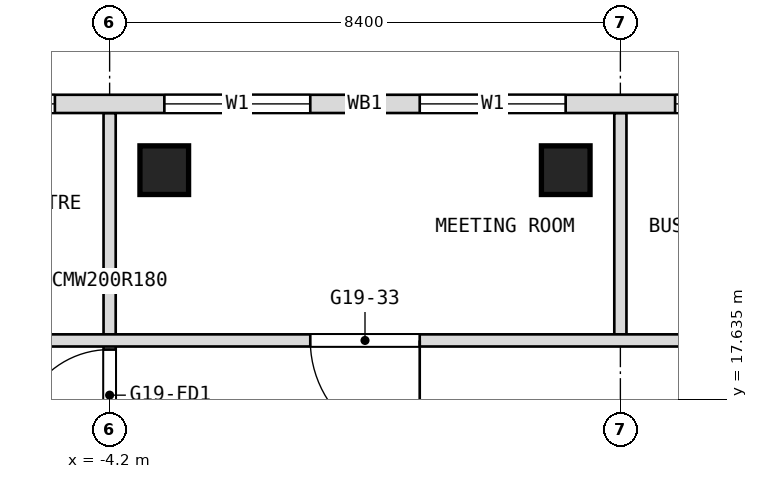
"""IFC4 building model, lengths in metres.
Left out: names, types, materials, properties, quantities, classifications, styles, units other than length and angle.
Written with IfcOpenShell. Run it as: python <this file> out.ifc"""

import sys

from ifc_helpers import new_model, si_unit, direction, frame, frame_2d, origin, origin_2d, place, context, subcontext, project, spatial, rectangle, extrude, element, fill, save


model = new_model("IFC4")
c1 = context("Model", 3, precision=1e-05, world=origin(), true_north=direction((0.0, 1.0)))
c2 = subcontext(c1, "Body", "Model", "MODEL_VIEW")
j1 = project(units=[si_unit("LENGTHUNIT", "METRE"), si_unit("PLANEANGLEUNIT", "RADIAN")], contexts=[c1])
p1 = place(None, origin())
s1 = spatial("IfcSite", under=j1, at=p1, CompositionType="ELEMENT")
p2 = place(p1, origin())
s2 = spatial("IfcBuilding", under=s1, at=p2, CompositionType="ELEMENT")
p3 = place(p2, frame((0.0, 0.0, 223.7)))
s3 = spatial("IfcBuildingStorey", under=s2, at=p3, CompositionType="ELEMENT", Elevation=223.7)
for number, where, z_axis, x_axis in (
    (1, (-3.302, 21.4, 0.0), (0.0, 0.0, 1.0), (1.0, 0.0, 0.0)),
    (2, (3.302, 21.4, 0.0), (0.0, 0.0, 1.0), (1.0, 0.0, 0.0)),
):
    element("IfcColumn", number, at=place(p3, frame(where, z_axis=z_axis, x_axis=x_axis)), inside=s3, PredefinedType="COLUMN", context=c2, shape_type="SweptSolid", body=[
        extrude(rectangle(XDim=0.8, YDim=0.8, at=origin_2d()), origin(), (0.0, 0.0, 1.0), 3.6),
    ])
p4 = place(p3, frame((4.2, 18.7, 0.0), z_axis=(0.0, 0.0, 1.0), x_axis=(0.0, 1.0, 0.0)))
e3 = element("IfcWall", 3, at=p4, inside=s3, PredefinedType="PARTITIONING", context=c2, shape_type="SweptSolid", body=[
    extrude(rectangle(XDim=3.64, YDim=0.2, at=frame_2d((1.82, 0.0))), origin(), (0.0, 0.0, 1.0), 3.34),
])
p5 = place(p3, frame((-4.2, 16.8, 0.0), z_axis=(0.0, 0.0, 1.0), x_axis=(0.0, 1.0, 0.0)))
e4 = element("IfcWall", 4, at=p5, inside=s3, PredefinedType="PARTITIONING", context=c2, shape_type="SweptSolid", body=[
    extrude(rectangle(XDim=5.54, YDim=0.2, at=frame_2d((2.77, 0.0))), origin(), (0.0, 0.0, 1.0), 3.34),
])
p6 = place(p5, frame((0.15, 0.0, 0.0)))
e5 = element("IfcOpeningElement", 5, at=p6, cuts=e4, PredefinedType="OPENING", context=c2, shape_type="SweptSolid", body=[
    extrude(rectangle(XDim=1.5, YDim=2.1, at=frame_2d((0.75, 1.05))), frame((0.0, 0.1, 0.0), z_axis=(0.0, -1.0, 0.0), x_axis=(1.0, 0.0, 0.0)), (0.0, 0.0, 1.0), 0.2),
])
p7 = place(p3, frame((-16.9, 18.6, 0.0), z_axis=(0.0, 0.0, 1.0), x_axis=(1.0, 0.0, 0.0)))
e6 = element("IfcWall", 6, at=p7, inside=s3, PredefinedType="PARTITIONING", context=c2, shape_type="SweptSolid", body=[
    extrude(rectangle(XDim=33.8, YDim=0.2, at=frame_2d((16.9, 0.0))), origin(), (0.0, 0.0, 1.0), 3.34),
])
p8 = place(p7, frame((1.7, 0.0, 0.0)))
e7 = element("IfcOpeningElement", 7, at=p8, cuts=e6, PredefinedType="OPENING", context=c2, shape_type="SweptSolid", body=[
    extrude(rectangle(XDim=1.0, YDim=2.1, at=frame_2d((0.5, 1.05))), frame((0.0, 0.1, 0.0), z_axis=(0.0, -1.0, 0.0), x_axis=(1.0, 0.0, 0.0)), (0.0, 0.0, 1.0), 0.2),
])
p9 = place(p7, frame((7.6, 0.0, 0.0)))
e8 = element("IfcOpeningElement", 8, at=p9, cuts=e6, PredefinedType="OPENING", context=c2, shape_type="SweptSolid", body=[
    extrude(rectangle(XDim=1.8, YDim=2.1, at=frame_2d((0.9, 1.05))), frame((0.0, 0.1, 0.0), z_axis=(0.0, -1.0, 0.0), x_axis=(1.0, 0.0, 0.0)), (0.0, 0.0, 1.0), 0.2),
])
p10 = place(p7, frame((16.0, 0.0, 0.0)))
e9 = element("IfcOpeningElement", 9, at=p10, cuts=e6, PredefinedType="OPENING", context=c2, shape_type="SweptSolid", body=[
    extrude(rectangle(XDim=1.8, YDim=2.1, at=frame_2d((0.9, 1.05))), frame((0.0, 0.1, 0.0), z_axis=(0.0, -1.0, 0.0), x_axis=(1.0, 0.0, 0.0)), (0.0, 0.0, 1.0), 0.2),
])
p11 = place(p7, frame((24.4, 0.0, 0.0)))
e10 = element("IfcOpeningElement", 10, at=p11, cuts=e6, PredefinedType="OPENING", context=c2, shape_type="SweptSolid", body=[
    extrude(rectangle(XDim=1.8, YDim=2.1, at=frame_2d((0.9, 1.05))), frame((0.0, 0.1, 0.0), z_axis=(0.0, -1.0, 0.0), x_axis=(1.0, 0.0, 0.0)), (0.0, 0.0, 1.0), 0.2),
])
p12 = place(p7, frame((31.1, 0.0, 0.0)))
e11 = element("IfcOpeningElement", 11, at=p12, cuts=e6, PredefinedType="OPENING", context=c2, shape_type="SweptSolid", body=[
    extrude(rectangle(XDim=1.0, YDim=2.1, at=frame_2d((0.5, 1.05))), frame((0.0, 0.1, 0.0), z_axis=(0.0, -1.0, 0.0), x_axis=(1.0, 0.0, 0.0)), (0.0, 0.0, 1.0), 0.2),
])
p13 = place(p3, frame((19.206, 22.49, 0.0), z_axis=(0.0, 0.0, 1.0), x_axis=(-1.0, 0.0, 0.0)))
e12 = element("IfcWall", 12, at=p13, inside=s3, PredefinedType="NOTDEFINED", context=c2, shape_type="SweptSolid", body=[
    extrude(rectangle(XDim=38.412, YDim=0.3, at=frame_2d((19.206, 0.0))), origin(), (0.0, 0.0, 1.0), 3.6),
])
p14 = place(p13, frame((3.306, 0.0, 0.9)))
e13 = element("IfcOpeningElement", 13, at=p14, cuts=e12, PredefinedType="OPENING", context=c2, shape_type="SweptSolid", body=[
    extrude(rectangle(XDim=2.4, YDim=2.1, at=frame_2d((1.2, 1.05))), frame((0.0, 0.15, 0.0), z_axis=(0.0, -1.0, 0.0), x_axis=(1.0, 0.0, 0.0)), (0.0, 0.0, 1.0), 0.3),
])
p15 = place(p13, frame((7.506, 0.0, 0.9)))
e14 = element("IfcOpeningElement", 14, at=p15, cuts=e12, PredefinedType="OPENING", context=c2, shape_type="SweptSolid", body=[
    extrude(rectangle(XDim=2.4, YDim=2.1, at=frame_2d((1.2, 1.05))), frame((0.0, 0.15, 0.0), z_axis=(0.0, -1.0, 0.0), x_axis=(1.0, 0.0, 0.0)), (0.0, 0.0, 1.0), 0.3),
])
p16 = place(p13, frame((11.706, 0.0, 0.9)))
e15 = element("IfcOpeningElement", 15, at=p16, cuts=e12, PredefinedType="OPENING", context=c2, shape_type="SweptSolid", body=[
    extrude(rectangle(XDim=2.4, YDim=2.1, at=frame_2d((1.2, 1.05))), frame((0.0, 0.15, 0.0), z_axis=(0.0, -1.0, 0.0), x_axis=(1.0, 0.0, 0.0)), (0.0, 0.0, 1.0), 0.3),
])
p17 = place(p13, frame((15.906, 0.0, 0.9)))
e16 = element("IfcOpeningElement", 16, at=p17, cuts=e12, PredefinedType="OPENING", context=c2, shape_type="SweptSolid", body=[
    extrude(rectangle(XDim=2.4, YDim=2.1, at=frame_2d((1.2, 1.05))), frame((0.0, 0.15, 0.0), z_axis=(0.0, -1.0, 0.0), x_axis=(1.0, 0.0, 0.0)), (0.0, 0.0, 1.0), 0.3),
])
p18 = place(p13, frame((20.106, 0.0, 0.9)))
e17 = element("IfcOpeningElement", 17, at=p18, cuts=e12, PredefinedType="OPENING", context=c2, shape_type="SweptSolid", body=[
    extrude(rectangle(XDim=2.4, YDim=2.1, at=frame_2d((1.2, 1.05))), frame((0.0, 0.15, 0.0), z_axis=(0.0, -1.0, 0.0), x_axis=(1.0, 0.0, 0.0)), (0.0, 0.0, 1.0), 0.3),
])
p19 = place(p13, frame((24.306, 0.0, 0.9)))
e18 = element("IfcOpeningElement", 18, at=p19, cuts=e12, PredefinedType="OPENING", context=c2, shape_type="SweptSolid", body=[
    extrude(rectangle(XDim=2.4, YDim=2.1, at=frame_2d((1.2, 1.05))), frame((0.0, 0.15, 0.0), z_axis=(0.0, -1.0, 0.0), x_axis=(1.0, 0.0, 0.0)), (0.0, 0.0, 1.0), 0.3),
])
p20 = place(p13, frame((28.506, 0.0, 0.9)))
e19 = element("IfcOpeningElement", 19, at=p20, cuts=e12, PredefinedType="OPENING", context=c2, shape_type="SweptSolid", body=[
    extrude(rectangle(XDim=2.4, YDim=2.1, at=frame_2d((1.2, 1.05))), frame((0.0, 0.15, 0.0), z_axis=(0.0, -1.0, 0.0), x_axis=(1.0, 0.0, 0.0)), (0.0, 0.0, 1.0), 0.3),
])
p21 = place(p13, frame((32.706, 0.0, 0.9)))
e20 = element("IfcOpeningElement", 20, at=p21, cuts=e12, PredefinedType="OPENING", context=c2, shape_type="SweptSolid", body=[
    extrude(rectangle(XDim=2.4, YDim=2.1, at=frame_2d((1.2, 1.05))), frame((0.0, 0.15, 0.0), z_axis=(0.0, -1.0, 0.0), x_axis=(1.0, 0.0, 0.0)), (0.0, 0.0, 1.0), 0.3),
])
p22 = place(p10, origin())
e21 = element("IfcDoor", 21, at=p22, inside=s3, OperationType="DOUBLE_DOOR_SINGLE_SWING", PredefinedType="DOOR", context=c2, shape_type="SweptSolid", body=[
    extrude(rectangle(XDim=1.8, YDim=2.1, at=frame_2d((0.9, 1.05))), frame((0.0, 0.025, 0.0), z_axis=(0.0, -1.0, 0.0), x_axis=(1.0, 0.0, 0.0)), (0.0, 0.0, 1.0), 0.05),
])
fill(e9, e21)
p23 = place(p16, origin())
e22 = element("IfcWindow", 22, at=p23, inside=s3, PartitioningType="SINGLE_PANEL", PredefinedType="WINDOW", context=c2, shape_type="SweptSolid", body=[
    extrude(rectangle(XDim=2.4, YDim=2.1, at=frame_2d((1.2, 1.05))), frame((0.0, 0.03, 0.0), z_axis=(0.0, -1.0, 0.0), x_axis=(1.0, 0.0, 0.0)), (0.0, 0.0, 1.0), 0.06),
])
fill(e15, e22)
p24 = place(p17, origin())
e23 = element("IfcWindow", 23, at=p24, inside=s3, PartitioningType="SINGLE_PANEL", PredefinedType="WINDOW", context=c2, shape_type="SweptSolid", body=[
    extrude(rectangle(XDim=2.4, YDim=2.1, at=frame_2d((1.2, 1.05))), frame((0.0, 0.03, 0.0), z_axis=(0.0, -1.0, 0.0), x_axis=(1.0, 0.0, 0.0)), (0.0, 0.0, 1.0), 0.06),
])
fill(e16, e23)
p25 = place(p18, origin())
e24 = element("IfcWindow", 24, at=p25, inside=s3, PartitioningType="SINGLE_PANEL", PredefinedType="WINDOW", context=c2, shape_type="SweptSolid", body=[
    extrude(rectangle(XDim=2.4, YDim=2.1, at=frame_2d((1.2, 1.05))), frame((0.0, 0.03, 0.0), z_axis=(0.0, -1.0, 0.0), x_axis=(1.0, 0.0, 0.0)), (0.0, 0.0, 1.0), 0.06),
])
fill(e17, e24)
p26 = place(p19, origin())
e25 = element("IfcWindow", 25, at=p26, inside=s3, PartitioningType="SINGLE_PANEL", PredefinedType="WINDOW", context=c2, shape_type="SweptSolid", body=[
    extrude(rectangle(XDim=2.4, YDim=2.1, at=frame_2d((1.2, 1.05))), frame((0.0, 0.03, 0.0), z_axis=(0.0, -1.0, 0.0), x_axis=(1.0, 0.0, 0.0)), (0.0, 0.0, 1.0), 0.06),
])
fill(e18, e25)
p27 = place(p6, origin())
e26 = element("IfcDoor", 26, at=p27, inside=s3, OperationType="DOUBLE_DOOR_DOUBLE_SWING", PredefinedType="DOOR", context=c2, shape_type="SweptSolid", body=[
    extrude(rectangle(XDim=1.5, YDim=2.1, at=frame_2d((0.75, 1.05))), frame((0.0, 0.025, 0.0), z_axis=(0.0, -1.0, 0.0), x_axis=(1.0, 0.0, 0.0)), (0.0, 0.0, 1.0), 0.05),
])
fill(e5, e26)
save(model, sys.argv[1])
